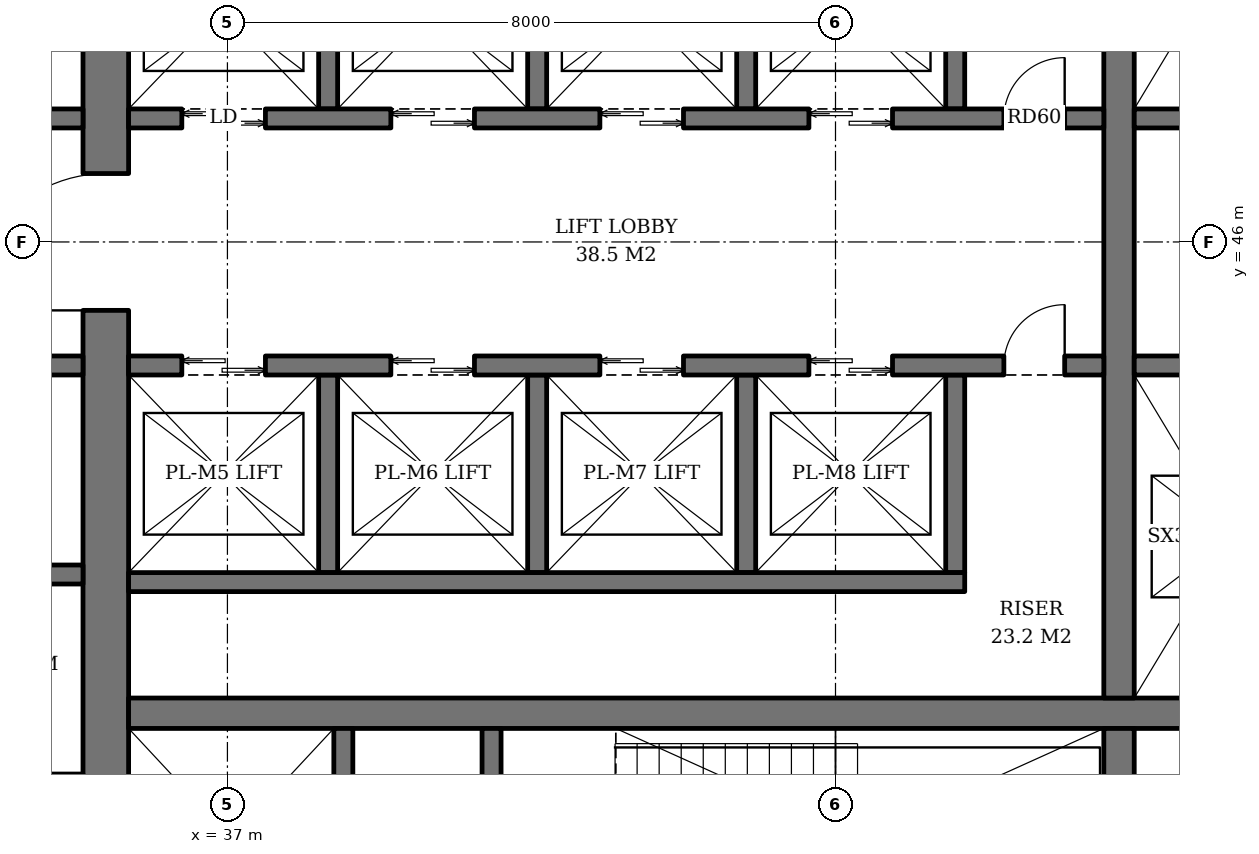
"""IFC4 building model, lengths in metres.
Left out: names, types, materials, properties, quantities, classifications, styles, units other than length and angle.
Written with IfcOpenShell. Run it as: python <this file> out.ifc"""

import sys

from ifc_helpers import new_model, si_unit, direction, frame, frame_2d, origin, place, context, subcontext, project, spatial, rectangle, extrude, element, fill, save


model = new_model("IFC4")
c1 = context("Model", 3, precision=1e-05, world=origin(), true_north=direction((0.0, 1.0)))
c2 = subcontext(c1, "Body", "Model", "MODEL_VIEW")
j1 = project(units=[si_unit("LENGTHUNIT", "METRE"), si_unit("PLANEANGLEUNIT", "RADIAN")], contexts=[c1])
p1 = place(None, origin())
s1 = spatial("IfcSite", under=j1, at=p1, CompositionType="ELEMENT")
p2 = place(p1, origin())
s2 = spatial("IfcBuilding", under=s1, at=p2, CompositionType="ELEMENT")
p3 = place(p2, frame((0.0, 0.0, 150.2)))
s3 = spatial("IfcBuildingStorey", under=s2, at=p3, CompositionType="ELEMENT", Elevation=150.2)
p4 = place(p3, frame((35.4, 36.7, 0.0), z_axis=(0.0, 0.0, 1.0), x_axis=(0.0, 1.0, 0.0)))
e1 = element("IfcWall", 1, at=p4, inside=s3, PredefinedType="SHEAR", context=c2, shape_type="SweptSolid", body=[
    extrude(rectangle(XDim=18.6, YDim=0.6, at=frame_2d((9.3, 0.0))), origin(), (0.0, 0.0, 1.0), 3.8),
])
p5 = place(p4, frame((8.4, 0.0, 0.0)))
e2 = element("IfcOpeningElement", 2, at=p5, cuts=e1, PredefinedType="OPENING", context=c2, shape_type="SweptSolid", body=[
    extrude(rectangle(XDim=1.8, YDim=2.4, at=frame_2d((0.9, 1.2))), frame((0.0, 0.31, 0.0), z_axis=(0.0, -1.0, 0.0), x_axis=(1.0, 0.0, 0.0)), (0.0, 0.0, 1.0), 0.62),
])
p6 = place(p3, frame((35.7, 39.8, 0.0), z_axis=(0.0, 0.0, 1.0), x_axis=(1.0, 0.0, 0.0)))
e3 = element("IfcWall", 3, at=p6, inside=s3, PredefinedType="SHEAR", context=c2, shape_type="SweptSolid", body=[
    extrude(rectangle(XDim=18.6, YDim=0.4, at=frame_2d((9.3, 0.0))), origin(), (0.0, 0.0, 1.0), 3.8),
])
p7 = place(p3, frame((48.73, 36.7, 0.0), z_axis=(0.0, 0.0, 1.0), x_axis=(0.0, 1.0, 0.0)))
e4 = element("IfcWall", 4, at=p7, inside=s3, PredefinedType="SHEAR", context=c2, shape_type="SweptSolid", body=[
    extrude(rectangle(XDim=2.9, YDim=0.4, at=frame_2d((1.45, 0.0))), origin(), (0.0, 0.0, 1.0), 3.8),
])
p8 = place(p3, frame((48.73, 40.0, 0.0), z_axis=(0.0, 0.0, 1.0), x_axis=(0.0, 1.0, 0.0)))
e5 = element("IfcWall", 5, at=p8, inside=s3, PredefinedType="SHEAR", context=c2, shape_type="SweptSolid", body=[
    extrude(rectangle(XDim=12.0, YDim=0.4, at=frame_2d((6.0, 0.0))), origin(), (0.0, 0.0, 1.0), 3.8),
])
p9 = place(p3, frame((38.525, 36.7, 0.0), z_axis=(0.0, 0.0, 1.0), x_axis=(0.0, 1.0, 0.0)))
e6 = element("IfcWall", 6, at=p9, inside=s3, PredefinedType="SHEAR", context=c2, shape_type="SweptSolid", body=[
    extrude(rectangle(XDim=2.9, YDim=0.25, at=frame_2d((1.45, 0.0))), origin(), (0.0, 0.0, 1.0), 3.8),
])
p10 = place(p9, frame((0.8, 0.0, 0.0)))
e7 = element("IfcOpeningElement", 7, at=p10, cuts=e6, PredefinedType="OPENING", context=c2, shape_type="SweptSolid", body=[
    extrude(rectangle(XDim=1.3, YDim=2.2, at=frame_2d((0.65, 1.1))), frame((0.0, 0.135, 0.0), z_axis=(0.0, -1.0, 0.0), x_axis=(1.0, 0.0, 0.0)), (0.0, 0.0, 1.0), 0.27),
])
p11 = place(p3, frame((40.475, 36.7, 0.0), z_axis=(0.0, 0.0, 1.0), x_axis=(0.0, 1.0, 0.0)))
e8 = element("IfcWall", 8, at=p11, inside=s3, PredefinedType="SHEAR", context=c2, shape_type="SweptSolid", body=[
    extrude(rectangle(XDim=2.9, YDim=0.25, at=frame_2d((1.45, 0.0))), origin(), (0.0, 0.0, 1.0), 3.8),
])
p12 = place(p11, frame((0.75, 0.0, 0.0)))
e9 = element("IfcOpeningElement", 9, at=p12, cuts=e8, PredefinedType="OPENING", context=c2, shape_type="SweptSolid", body=[
    extrude(rectangle(XDim=1.2, YDim=2.1, at=frame_2d((0.6, 1.05))), frame((0.0, 0.135, 0.0), z_axis=(0.0, -1.0, 0.0), x_axis=(1.0, 0.0, 0.0)), (0.0, 0.0, 1.0), 0.27),
])
for number, where, z_axis, x_axis in (
    (10, (38.325, 47.75, 0.0), (0.0, 0.0, 1.0), (0.0, 1.0, 0.0)),
    (11, (41.075, 47.75, 0.0), (0.0, 0.0, 1.0), (0.0, 1.0, 0.0)),
    (12, (43.825, 47.75, 0.0), (0.0, 0.0, 1.0), (0.0, 1.0, 0.0)),
    (13, (46.575, 47.75, 0.0), (0.0, 0.0, 1.0), (0.0, 1.0, 0.0)),
):
    element("IfcWall", number, at=place(p3, frame(where, z_axis=z_axis, x_axis=x_axis)), inside=s3, PredefinedType="SHEAR", context=c2, shape_type="SweptSolid", body=[
        extrude(rectangle(XDim=2.6, YDim=0.25, at=frame_2d((1.3, 0.0))), origin(), (0.0, 0.0, 1.0), 3.8),
    ])
p13 = place(p3, frame((35.7, 47.625, 0.0), z_axis=(0.0, 0.0, 1.0), x_axis=(1.0, 0.0, 0.0)))
e14 = element("IfcWall", 14, at=p13, inside=s3, PredefinedType="SHEAR", context=c2, shape_type="SweptSolid", body=[
    extrude(rectangle(XDim=12.83, YDim=0.25, at=frame_2d((6.415, 0.0))), origin(), (0.0, 0.0, 1.0), 3.8),
])
p14 = place(p13, frame((0.7, 0.0, 0.0)))
e15 = element("IfcOpeningElement", 15, at=p14, cuts=e14, PredefinedType="OPENING", context=c2, shape_type="SweptSolid", body=[
    extrude(rectangle(XDim=1.1, YDim=2.2, at=frame_2d((0.55, 1.1))), frame((0.0, 0.135, 0.0), z_axis=(0.0, -1.0, 0.0), x_axis=(1.0, 0.0, 0.0)), (0.0, 0.0, 1.0), 0.27),
])
p15 = place(p13, frame((3.45, 0.0, 0.0)))
e16 = element("IfcOpeningElement", 16, at=p15, cuts=e14, PredefinedType="OPENING", context=c2, shape_type="SweptSolid", body=[
    extrude(rectangle(XDim=1.1, YDim=2.2, at=frame_2d((0.55, 1.1))), frame((0.0, 0.135, 0.0), z_axis=(0.0, -1.0, 0.0), x_axis=(1.0, 0.0, 0.0)), (0.0, 0.0, 1.0), 0.27),
])
p16 = place(p13, frame((6.2, 0.0, 0.0)))
e17 = element("IfcOpeningElement", 17, at=p16, cuts=e14, PredefinedType="OPENING", context=c2, shape_type="SweptSolid", body=[
    extrude(rectangle(XDim=1.1, YDim=2.2, at=frame_2d((0.55, 1.1))), frame((0.0, 0.135, 0.0), z_axis=(0.0, -1.0, 0.0), x_axis=(1.0, 0.0, 0.0)), (0.0, 0.0, 1.0), 0.27),
])
p17 = place(p13, frame((8.95, 0.0, 0.0)))
e18 = element("IfcOpeningElement", 18, at=p17, cuts=e14, PredefinedType="OPENING", context=c2, shape_type="SweptSolid", body=[
    extrude(rectangle(XDim=1.1, YDim=2.2, at=frame_2d((0.55, 1.1))), frame((0.0, 0.135, 0.0), z_axis=(0.0, -1.0, 0.0), x_axis=(1.0, 0.0, 0.0)), (0.0, 0.0, 1.0), 0.27),
])
p18 = place(p13, frame((11.515, 0.0, 0.0)))
e19 = element("IfcOpeningElement", 19, at=p18, cuts=e14, PredefinedType="OPENING", context=c2, shape_type="SweptSolid", body=[
    extrude(rectangle(XDim=0.8, YDim=2.0, at=frame_2d((0.4, 1.0))), frame((0.0, 0.135, 0.0), z_axis=(0.0, -1.0, 0.0), x_axis=(1.0, 0.0, 0.0)), (0.0, 0.0, 1.0), 0.27),
])
for number, where, z_axis, x_axis in (
    (20, (38.325, 44.25, 0.0), (0.0, 0.0, 1.0), (0.0, -1.0, 0.0)),
    (21, (41.075, 44.25, 0.0), (0.0, 0.0, 1.0), (0.0, -1.0, 0.0)),
    (22, (43.825, 44.25, 0.0), (0.0, 0.0, 1.0), (0.0, -1.0, 0.0)),
    (23, (46.575, 44.25, 0.0), (0.0, 0.0, 1.0), (0.0, -1.0, 0.0)),
):
    element("IfcWall", number, at=place(p3, frame(where, z_axis=z_axis, x_axis=x_axis)), inside=s3, PredefinedType="SHEAR", context=c2, shape_type="SweptSolid", body=[
        extrude(rectangle(XDim=2.6, YDim=0.25, at=frame_2d((1.3, 0.0))), origin(), (0.0, 0.0, 1.0), 3.8),
    ])
p19 = place(p3, frame((35.7, 41.525, 0.0), z_axis=(0.0, 0.0, 1.0), x_axis=(1.0, 0.0, 0.0)))
e24 = element("IfcWall", 24, at=p19, inside=s3, PredefinedType="SHEAR", context=c2, shape_type="SweptSolid", body=[
    extrude(rectangle(XDim=11.0, YDim=0.25, at=frame_2d((5.5, 0.0))), origin(), (0.0, 0.0, 1.0), 3.8),
])
p20 = place(p3, frame((35.7, 44.375, 0.0), z_axis=(0.0, 0.0, 1.0), x_axis=(1.0, 0.0, 0.0)))
e25 = element("IfcWall", 25, at=p20, inside=s3, PredefinedType="SHEAR", context=c2, shape_type="SweptSolid", body=[
    extrude(rectangle(XDim=12.83, YDim=0.25, at=frame_2d((6.415, 0.0))), origin(), (0.0, 0.0, 1.0), 3.8),
])
p21 = place(p20, frame((0.7, 0.0, 0.0)))
e26 = element("IfcOpeningElement", 26, at=p21, cuts=e25, PredefinedType="OPENING", context=c2, shape_type="SweptSolid", body=[
    extrude(rectangle(XDim=1.1, YDim=2.2, at=frame_2d((0.55, 1.1))), frame((0.0, 0.135, 0.0), z_axis=(0.0, -1.0, 0.0), x_axis=(1.0, 0.0, 0.0)), (0.0, 0.0, 1.0), 0.27),
])
p22 = place(p20, frame((3.45, 0.0, 0.0)))
e27 = element("IfcOpeningElement", 27, at=p22, cuts=e25, PredefinedType="OPENING", context=c2, shape_type="SweptSolid", body=[
    extrude(rectangle(XDim=1.1, YDim=2.2, at=frame_2d((0.55, 1.1))), frame((0.0, 0.135, 0.0), z_axis=(0.0, -1.0, 0.0), x_axis=(1.0, 0.0, 0.0)), (0.0, 0.0, 1.0), 0.27),
])
p23 = place(p20, frame((6.2, 0.0, 0.0)))
e28 = element("IfcOpeningElement", 28, at=p23, cuts=e25, PredefinedType="OPENING", context=c2, shape_type="SweptSolid", body=[
    extrude(rectangle(XDim=1.1, YDim=2.2, at=frame_2d((0.55, 1.1))), frame((0.0, 0.135, 0.0), z_axis=(0.0, -1.0, 0.0), x_axis=(1.0, 0.0, 0.0)), (0.0, 0.0, 1.0), 0.27),
])
p24 = place(p20, frame((8.95, 0.0, 0.0)))
e29 = element("IfcOpeningElement", 29, at=p24, cuts=e25, PredefinedType="OPENING", context=c2, shape_type="SweptSolid", body=[
    extrude(rectangle(XDim=1.1, YDim=2.2, at=frame_2d((0.55, 1.1))), frame((0.0, 0.135, 0.0), z_axis=(0.0, -1.0, 0.0), x_axis=(1.0, 0.0, 0.0)), (0.0, 0.0, 1.0), 0.27),
])
p25 = place(p20, frame((11.515, 0.0, 0.0)))
e30 = element("IfcOpeningElement", 30, at=p25, cuts=e25, PredefinedType="OPENING", context=c2, shape_type="SweptSolid", body=[
    extrude(rectangle(XDim=0.8, YDim=2.0, at=frame_2d((0.4, 1.0))), frame((0.0, 0.135, 0.0), z_axis=(0.0, -1.0, 0.0), x_axis=(1.0, 0.0, 0.0)), (0.0, 0.0, 1.0), 0.27),
])
for number, where, z_axis, x_axis in (
    (31, (48.93, 47.625, 0.0), (0.0, 0.0, 1.0), (1.0, 0.0, 0.0)),
    (32, (48.93, 44.375, 0.0), (0.0, 0.0, 1.0), (1.0, 0.0, 0.0)),
):
    element("IfcWall", number, at=place(p3, frame(where, z_axis=z_axis, x_axis=x_axis)), inside=s3, PredefinedType="SHEAR", context=c2, shape_type="SweptSolid", body=[
        extrude(rectangle(XDim=5.37, YDim=0.25, at=frame_2d((2.685, 0.0))), origin(), (0.0, 0.0, 1.0), 3.8),
    ])
for number, where, z_axis, x_axis in (
    (33, (32.4, 41.625, 0.0), (0.0, 0.0, 1.0), (1.0, 0.0, 0.0)),
    (34, (32.4, 44.375, 0.0), (0.0, 0.0, 1.0), (1.0, 0.0, 0.0)),
    (35, (32.4, 47.625, 0.0), (0.0, 0.0, 1.0), (1.0, 0.0, 0.0)),
):
    element("IfcWall", number, at=place(p3, frame(where, z_axis=z_axis, x_axis=x_axis)), inside=s3, PredefinedType="SHEAR", context=c2, shape_type="SweptSolid", body=[
        extrude(rectangle(XDim=2.7, YDim=0.25, at=frame_2d((1.35, 0.0))), origin(), (0.0, 0.0, 1.0), 3.8),
    ])
p26 = place(p14, origin())
e36 = element("IfcDoor", 36, at=p26, inside=s3, OperationType="DOUBLE_DOOR_SLIDING", PredefinedType="DOOR", context=c2, shape_type="SweptSolid", body=[
    extrude(rectangle(XDim=1.1, YDim=2.2, at=frame_2d((0.55, 1.1))), frame((0.0, 0.025, 0.0), z_axis=(0.0, -1.0, 0.0), x_axis=(1.0, 0.0, 0.0)), (0.0, 0.0, 1.0), 0.05),
])
fill(e15, e36)
p27 = place(p15, origin())
e37 = element("IfcDoor", 37, at=p27, inside=s3, OperationType="DOUBLE_DOOR_SLIDING", PredefinedType="DOOR", context=c2, shape_type="SweptSolid", body=[
    extrude(rectangle(XDim=1.1, YDim=2.2, at=frame_2d((0.55, 1.1))), frame((0.0, 0.025, 0.0), z_axis=(0.0, -1.0, 0.0), x_axis=(1.0, 0.0, 0.0)), (0.0, 0.0, 1.0), 0.05),
])
fill(e16, e37)
p28 = place(p16, origin())
e38 = element("IfcDoor", 38, at=p28, inside=s3, OperationType="DOUBLE_DOOR_SLIDING", PredefinedType="DOOR", context=c2, shape_type="SweptSolid", body=[
    extrude(rectangle(XDim=1.1, YDim=2.2, at=frame_2d((0.55, 1.1))), frame((0.0, 0.025, 0.0), z_axis=(0.0, -1.0, 0.0), x_axis=(1.0, 0.0, 0.0)), (0.0, 0.0, 1.0), 0.05),
])
fill(e17, e38)
p29 = place(p17, origin())
e39 = element("IfcDoor", 39, at=p29, inside=s3, OperationType="DOUBLE_DOOR_SLIDING", PredefinedType="DOOR", context=c2, shape_type="SweptSolid", body=[
    extrude(rectangle(XDim=1.1, YDim=2.2, at=frame_2d((0.55, 1.1))), frame((0.0, 0.025, 0.0), z_axis=(0.0, -1.0, 0.0), x_axis=(1.0, 0.0, 0.0)), (0.0, 0.0, 1.0), 0.05),
])
fill(e18, e39)
p30 = place(p18, origin())
e40 = element("IfcDoor", 40, at=p30, inside=s3, OperationType="SINGLE_SWING_RIGHT", PredefinedType="DOOR", context=c2, shape_type="SweptSolid", body=[
    extrude(rectangle(XDim=0.8, YDim=2.0, at=frame_2d((0.4, 1.0))), frame((0.0, 0.025, 0.0), z_axis=(0.0, -1.0, 0.0), x_axis=(1.0, 0.0, 0.0)), (0.0, 0.0, 1.0), 0.05),
])
fill(e19, e40)
p31 = place(p21, origin())
e41 = element("IfcDoor", 41, at=p31, inside=s3, OperationType="DOUBLE_DOOR_SLIDING", PredefinedType="DOOR", context=c2, shape_type="SweptSolid", body=[
    extrude(rectangle(XDim=1.1, YDim=2.2, at=frame_2d((0.55, 1.1))), frame((0.0, 0.025, 0.0), z_axis=(0.0, -1.0, 0.0), x_axis=(1.0, 0.0, 0.0)), (0.0, 0.0, 1.0), 0.05),
])
fill(e26, e41)
p32 = place(p22, origin())
e42 = element("IfcDoor", 42, at=p32, inside=s3, OperationType="DOUBLE_DOOR_SLIDING", PredefinedType="DOOR", context=c2, shape_type="SweptSolid", body=[
    extrude(rectangle(XDim=1.1, YDim=2.2, at=frame_2d((0.55, 1.1))), frame((0.0, 0.025, 0.0), z_axis=(0.0, -1.0, 0.0), x_axis=(1.0, 0.0, 0.0)), (0.0, 0.0, 1.0), 0.05),
])
fill(e27, e42)
p33 = place(p23, origin())
e43 = element("IfcDoor", 43, at=p33, inside=s3, OperationType="DOUBLE_DOOR_SLIDING", PredefinedType="DOOR", context=c2, shape_type="SweptSolid", body=[
    extrude(rectangle(XDim=1.1, YDim=2.2, at=frame_2d((0.55, 1.1))), frame((0.0, 0.025, 0.0), z_axis=(0.0, -1.0, 0.0), x_axis=(1.0, 0.0, 0.0)), (0.0, 0.0, 1.0), 0.05),
])
fill(e28, e43)
p34 = place(p24, origin())
e44 = element("IfcDoor", 44, at=p34, inside=s3, OperationType="DOUBLE_DOOR_SLIDING", PredefinedType="DOOR", context=c2, shape_type="SweptSolid", body=[
    extrude(rectangle(XDim=1.1, YDim=2.2, at=frame_2d((0.55, 1.1))), frame((0.0, 0.025, 0.0), z_axis=(0.0, -1.0, 0.0), x_axis=(1.0, 0.0, 0.0)), (0.0, 0.0, 1.0), 0.05),
])
fill(e29, e44)
p35 = place(p25, origin())
e45 = element("IfcDoor", 45, at=p35, inside=s3, OperationType="SINGLE_SWING_RIGHT", PredefinedType="DOOR", context=c2, shape_type="SweptSolid", body=[
    extrude(rectangle(XDim=0.8, YDim=2.0, at=frame_2d((0.4, 1.0))), frame((0.0, 0.025, 0.0), z_axis=(0.0, -1.0, 0.0), x_axis=(1.0, 0.0, 0.0)), (0.0, 0.0, 1.0), 0.05),
])
fill(e30, e45)
p36 = place(p5, origin())
e46 = element("IfcDoor", 46, at=p36, inside=s3, OperationType="DOUBLE_DOOR_SINGLE_SWING", PredefinedType="DOOR", context=c2, shape_type="SweptSolid", body=[
    extrude(rectangle(XDim=1.8, YDim=2.4, at=frame_2d((0.9, 1.2))), frame((0.0, 0.025, 0.0), z_axis=(0.0, -1.0, 0.0), x_axis=(1.0, 0.0, 0.0)), (0.0, 0.0, 1.0), 0.05),
])
fill(e2, e46)
save(model, sys.argv[1])
